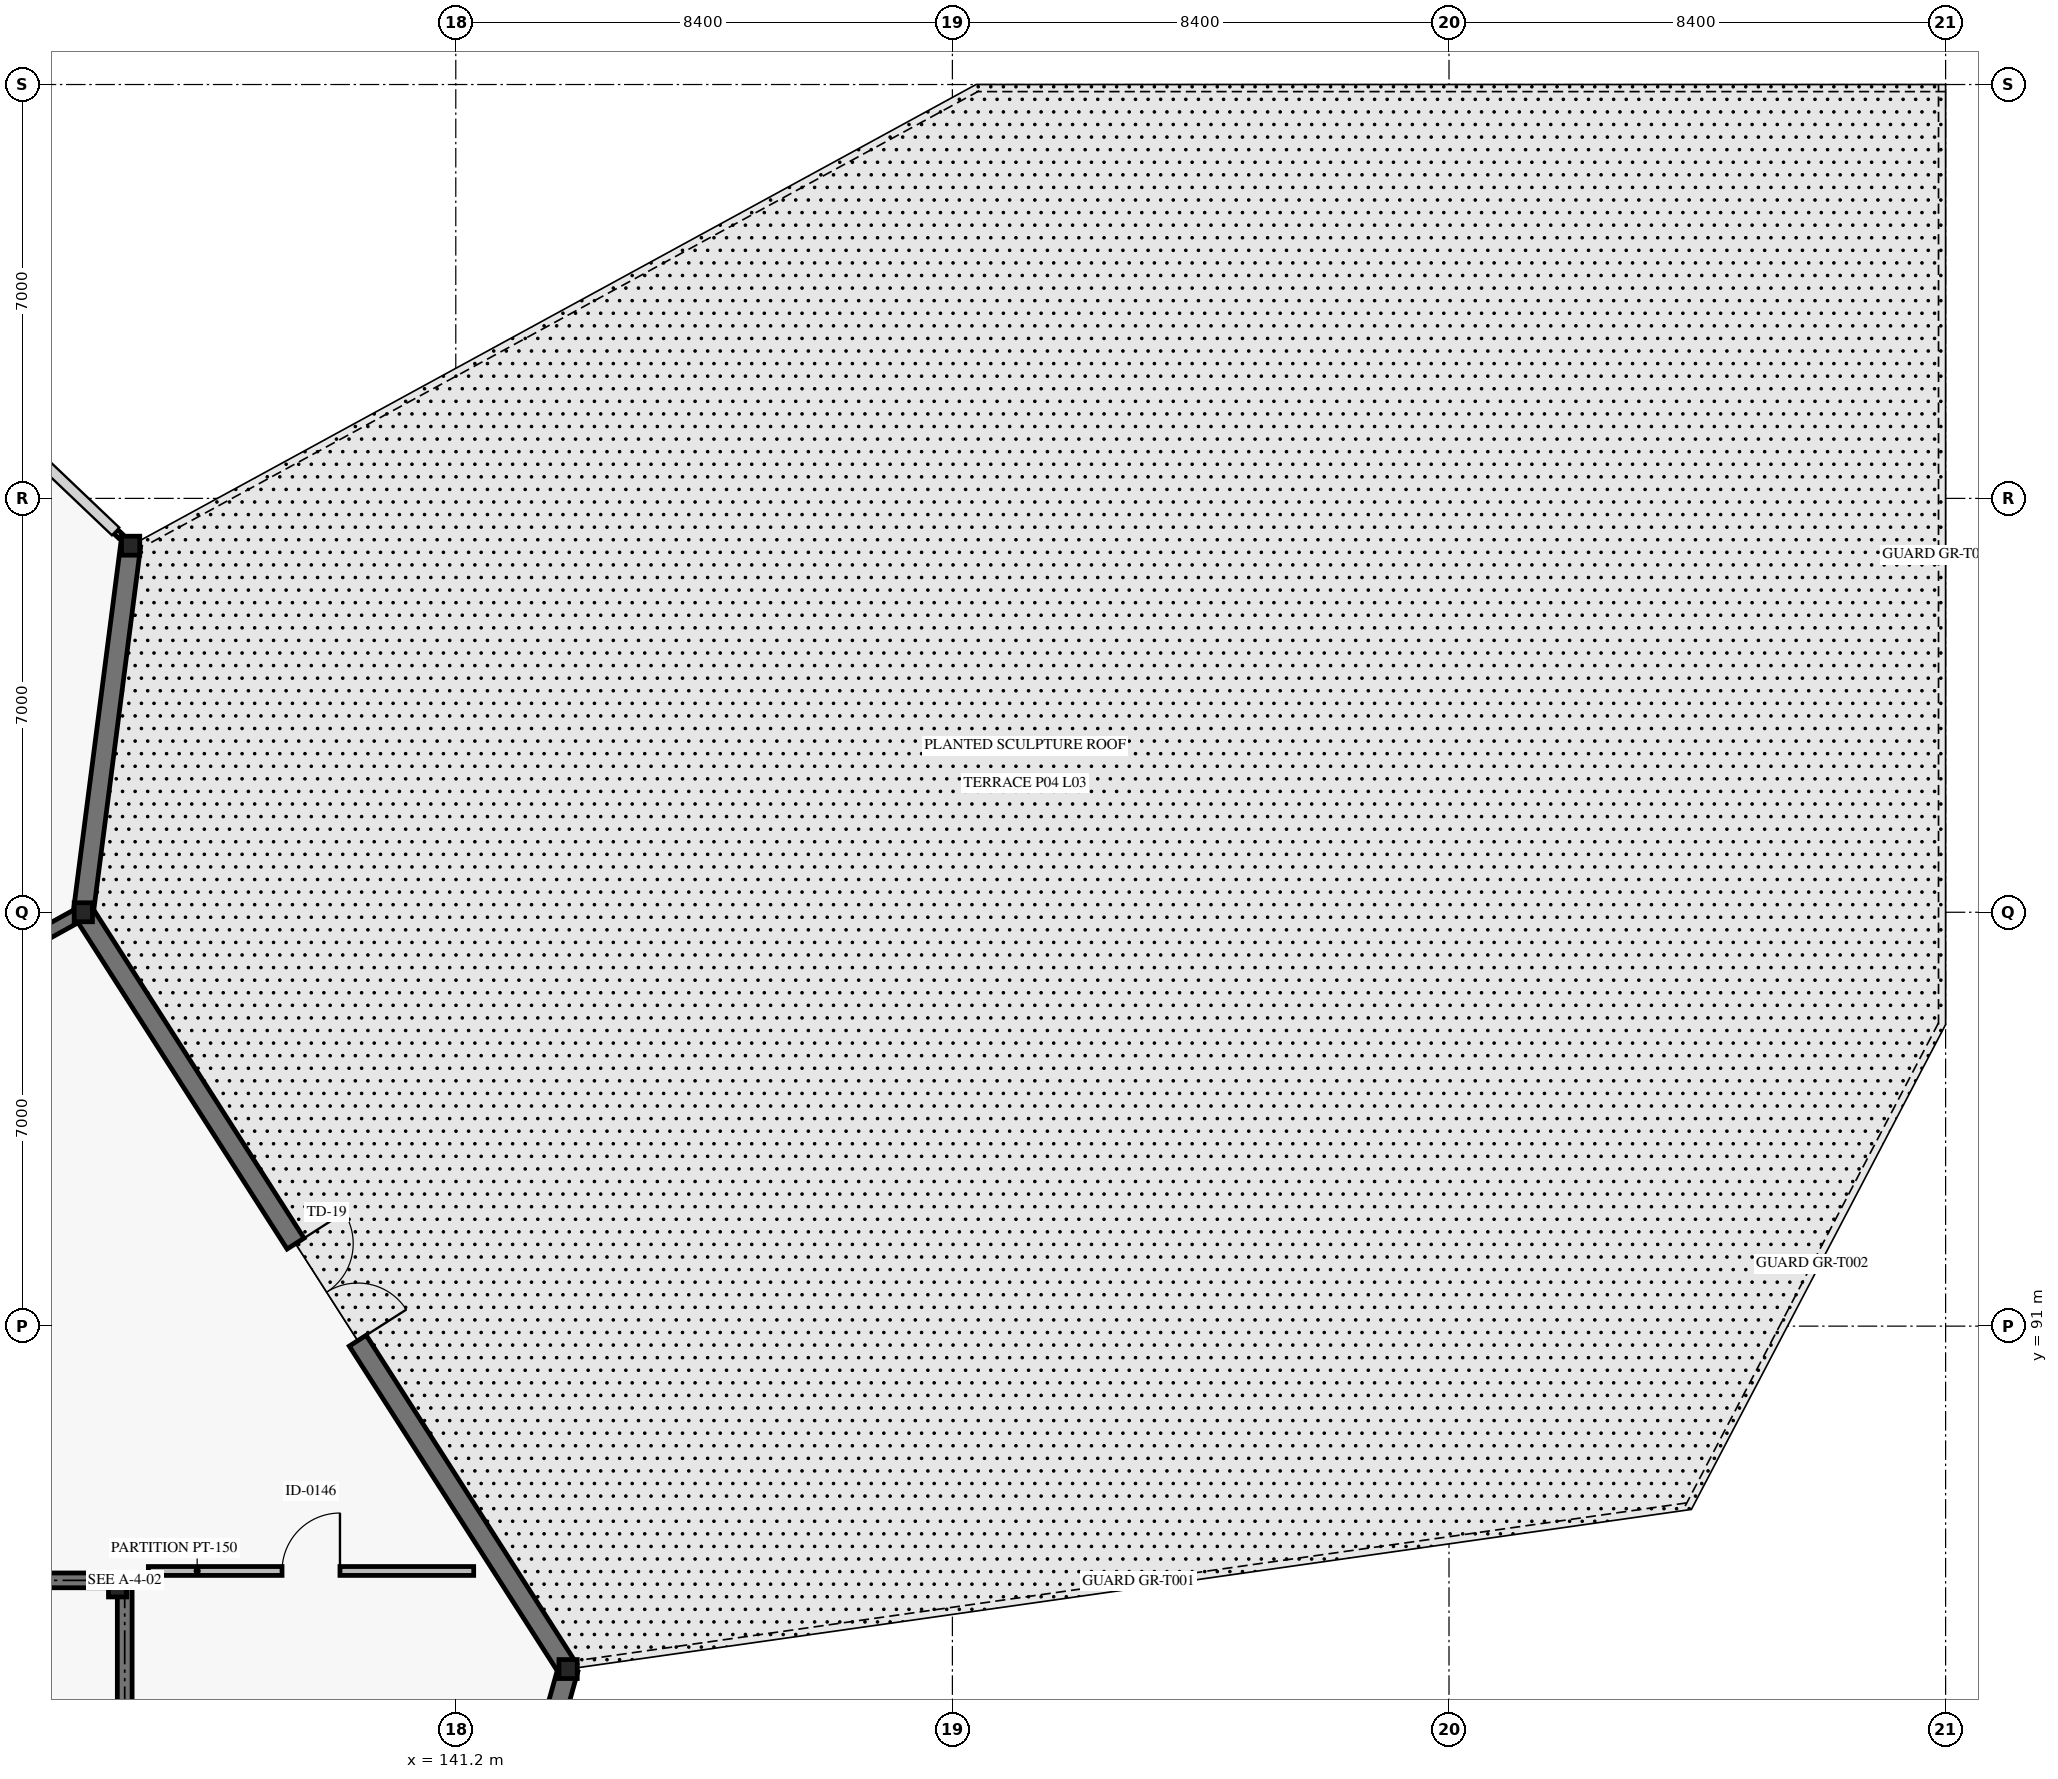
"""IFC4 building model, lengths in metres.
Left out: names, types, materials, properties, quantities, classifications, styles, units other than length and angle.
Written with IfcOpenShell. Run it as: python <this file> out.ifc"""

import sys

from ifc_helpers import new_model, si_unit, direction, frame, frame_2d, origin, origin_2d, place, context, subcontext, project, spatial, rectangle, i_section, extrude, element, fill, save


model = new_model("IFC4")
c1 = context("Model", 3, precision=1e-05, world=origin(), true_north=direction((0.0, 1.0)))
c2 = subcontext(c1, "Body", "Model", "MODEL_VIEW")
j1 = project(units=[si_unit("LENGTHUNIT", "METRE"), si_unit("PLANEANGLEUNIT", "RADIAN")], contexts=[c1])
p1 = place(None, origin())
s1 = spatial("IfcSite", under=j1, at=p1, CompositionType="ELEMENT")
p2 = place(p1, origin())
s2 = spatial("IfcBuilding", under=s1, at=p2, CompositionType="ELEMENT")
p3 = place(p2, frame((0.0, 0.0, 15.0)))
s3 = spatial("IfcBuildingStorey", under=s2, at=p3, CompositionType="ELEMENT", Elevation=15.0)
for number, where, z_axis, x_axis in (
    (1, (134.9, 98.0, 0.0), (0.0, 0.0, 1.0), (1.0, 0.0, 0.0)),
    (2, (135.7, 104.2, 0.0), (0.0, 0.0, 1.0), (1.0, 0.0, 0.0)),
    (3, (143.1, 85.2, 0.0), (0.0, 0.0, 1.0), (1.0, 0.0, 0.0)),
    (4, (135.48, 86.58, 0.0), (0.0, 0.0, 1.0), (1.0, 0.0, 0.0)),
):
    element("IfcColumn", number, at=place(p3, frame(where, z_axis=z_axis, x_axis=x_axis)), inside=s3, PredefinedType="COLUMN", context=c2, shape_type="SweptSolid", body=[
        extrude(i_section(OverallWidth=0.309, OverallDepth=0.321, WebThickness=0.014, FlangeThickness=0.022, FilletRadius=0.017, at=origin_2d()), origin(), (0.0, 0.0, 1.0), 4.8),
    ])
p4 = place(p3, frame((143.1, 85.2, 0.0), z_axis=(0.0, 0.0, 1.0), x_axis=(-0.268807620494, -0.96319388659, 0.0)))
e5 = element("IfcWall", 5, at=p4, inside=s3, PredefinedType="SOLIDWALL", context=c2, shape_type="SweptSolid", body=[
    extrude(rectangle(XDim=13.393, YDim=0.34, at=frame_2d((6.696, 0.0))), origin(), (0.0, 0.0, 1.0), 3.62),
])
p5 = place(p3, frame((134.932, 97.95, 0.0), z_axis=(0.0, 0.0, 1.0), x_axis=(0.539438422375, -0.84202505216, 0.0)))
e6 = element("IfcWall", 6, at=p5, inside=s3, PredefinedType="SOLIDWALL", context=c2, shape_type="SweptSolid", body=[
    extrude(rectangle(XDim=15.142, YDim=0.34, at=frame_2d((7.571, 0.0))), origin(), (0.0, 0.0, 1.0), 3.62),
])
p6 = place(p5, frame((6.596, 0.0, 0.0)))
e7 = element("IfcOpeningElement", 7, at=p6, cuts=e6, PredefinedType="OPENING", context=c2, shape_type="SweptSolid", body=[
    extrude(rectangle(XDim=1.95, YDim=2.3, at=frame_2d((0.975, 1.15))), frame((0.0, 0.18, 0.0), z_axis=(0.0, -1.0, 0.0), x_axis=(1.0, 0.0, 0.0)), (0.0, 0.0, 1.0), 0.36),
])
p7 = place(p3, frame((135.7, 104.2, 0.0), z_axis=(0.0, 0.0, 1.0), x_axis=(-0.127911284164, -0.99178561362, 0.0)))
e8 = element("IfcWall", 8, at=p7, inside=s3, PredefinedType="SOLIDWALL", context=c2, shape_type="SweptSolid", body=[
    extrude(rectangle(XDim=6.192, YDim=0.34, at=frame_2d((3.096, 0.0))), origin(), (0.0, 0.0, 1.0), 3.62),
])
p8 = place(p3, frame((135.446, 104.441, 0.0), z_axis=(0.0, 0.0, 1.0), x_axis=(0.726243974232, -0.687437044311, 0.0)))
e9 = element("IfcWall", 9, at=p8, inside=s3, PredefinedType="SOLIDWALL", context=c2, shape_type="SweptSolid", body=[
    extrude(rectangle(XDim=0.308, YDim=0.095, at=frame_2d((0.154, 0.0))), origin(), (0.0, 0.0, 1.0), 3.62),
])
p9 = place(p3, frame((134.9, 98.0, 0.0), z_axis=(0.0, 0.0, 1.0), x_axis=(-0.875181353329, -0.483794996652, 0.0)))
e10 = element("IfcWall", 10, at=p9, inside=s3, PredefinedType="SOLIDWALL", context=c2, shape_type="SweptSolid", body=[
    extrude(rectangle(XDim=18.396, YDim=0.225, at=frame_2d((9.198, 0.0))), origin(), (0.0, 0.0, 1.0), 4.02),
])
p10 = place(p9, frame((8.273, 0.0, 0.0)))
e11 = element("IfcOpeningElement", 11, at=p10, cuts=e10, PredefinedType="OPENING", context=c2, shape_type="SweptSolid", body=[
    extrude(rectangle(XDim=1.85, YDim=2.4, at=frame_2d((0.925, 1.2))), frame((0.0, 0.123, 0.0), z_axis=(0.0, -1.0, 0.0), x_axis=(1.0, 0.0, 0.0)), (0.0, 0.0, 1.0), 0.245),
])
p11 = place(p3, frame((136.0, 86.859, 0.0), z_axis=(0.0, 0.0, 1.0), x_axis=(1.0, 0.0, 0.0)))
e12 = element("IfcWall", 12, at=p11, inside=s3, PredefinedType="PARTITIONING", context=c2, shape_type="SweptSolid", body=[
    extrude(rectangle(XDim=5.503, YDim=0.15, at=frame_2d((2.751, 0.0))), origin(), (0.0, 0.0, 1.0), 3.32),
])
p12 = place(p11, frame((2.261, 0.0, 0.0)))
e13 = element("IfcOpeningElement", 13, at=p12, cuts=e12, PredefinedType="OPENING", context=c2, shape_type="SweptSolid", body=[
    extrude(rectangle(XDim=0.98, YDim=2.15, at=frame_2d((0.49, 1.075))), frame((0.0, 0.085, 0.0), z_axis=(0.0, -1.0, 0.0), x_axis=(1.0, 0.0, 0.0)), (0.0, 0.0, 1.0), 0.17),
])
p13 = place(p3, frame((126.4, 86.7, 0.0), z_axis=(0.0, 0.0, 1.0), x_axis=(1.0, 0.0, 0.0)))
e14 = element("IfcWall", 14, at=p13, inside=s3, PredefinedType="SHEAR", context=c2, shape_type="SweptSolid", body=[
    extrude(rectangle(XDim=9.2, YDim=0.25, at=frame_2d((4.6, 0.0))), origin(), (0.0, 0.0, 1.0), 4.56),
])
p14 = place(p3, frame((135.6, 86.7, 0.0), z_axis=(0.0, 0.0, 1.0), x_axis=(0.0, -1.0, 0.0)))
e15 = element("IfcWall", 15, at=p14, inside=s3, PredefinedType="SHEAR", context=c2, shape_type="SweptSolid", body=[
    extrude(rectangle(XDim=7.4, YDim=0.25, at=frame_2d((3.7, 0.0))), origin(), (0.0, 0.0, 1.0), 4.56),
])
p15 = place(p14, frame((5.25, 0.0, 0.0)))
e16 = element("IfcOpeningElement", 16, at=p15, cuts=e15, PredefinedType="OPENING", context=c2, shape_type="SweptSolid", body=[
    extrude(rectangle(XDim=1.2, YDim=2.2, at=frame_2d((0.6, 1.1))), frame((0.0, 0.135, 0.0), z_axis=(0.0, -1.0, 0.0), x_axis=(1.0, 0.0, 0.0)), (0.0, 0.0, 1.0), 0.27),
])
p16 = place(p6, origin())
e17 = element("IfcDoor", 17, at=p16, inside=s3, OperationType="DOUBLE_DOOR_SINGLE_SWING", PredefinedType="DOOR", context=c2, shape_type="SweptSolid", body=[
    extrude(rectangle(XDim=1.95, YDim=2.3, at=frame_2d((0.975, 1.15))), frame((0.0, 0.025, 0.0), z_axis=(0.0, -1.0, 0.0), x_axis=(1.0, 0.0, 0.0)), (0.0, 0.0, 1.0), 0.05),
])
fill(e7, e17)
p17 = place(p12, origin())
e18 = element("IfcDoor", 18, at=p17, inside=s3, OperationType="SINGLE_SWING_RIGHT", PredefinedType="DOOR", context=c2, shape_type="SweptSolid", body=[
    extrude(rectangle(XDim=0.98, YDim=2.15, at=frame_2d((0.49, 1.075))), frame((0.0, 0.025, 0.0), z_axis=(0.0, -1.0, 0.0), x_axis=(1.0, 0.0, 0.0)), (0.0, 0.0, 1.0), 0.05),
])
fill(e13, e18)
save(model, sys.argv[1])
